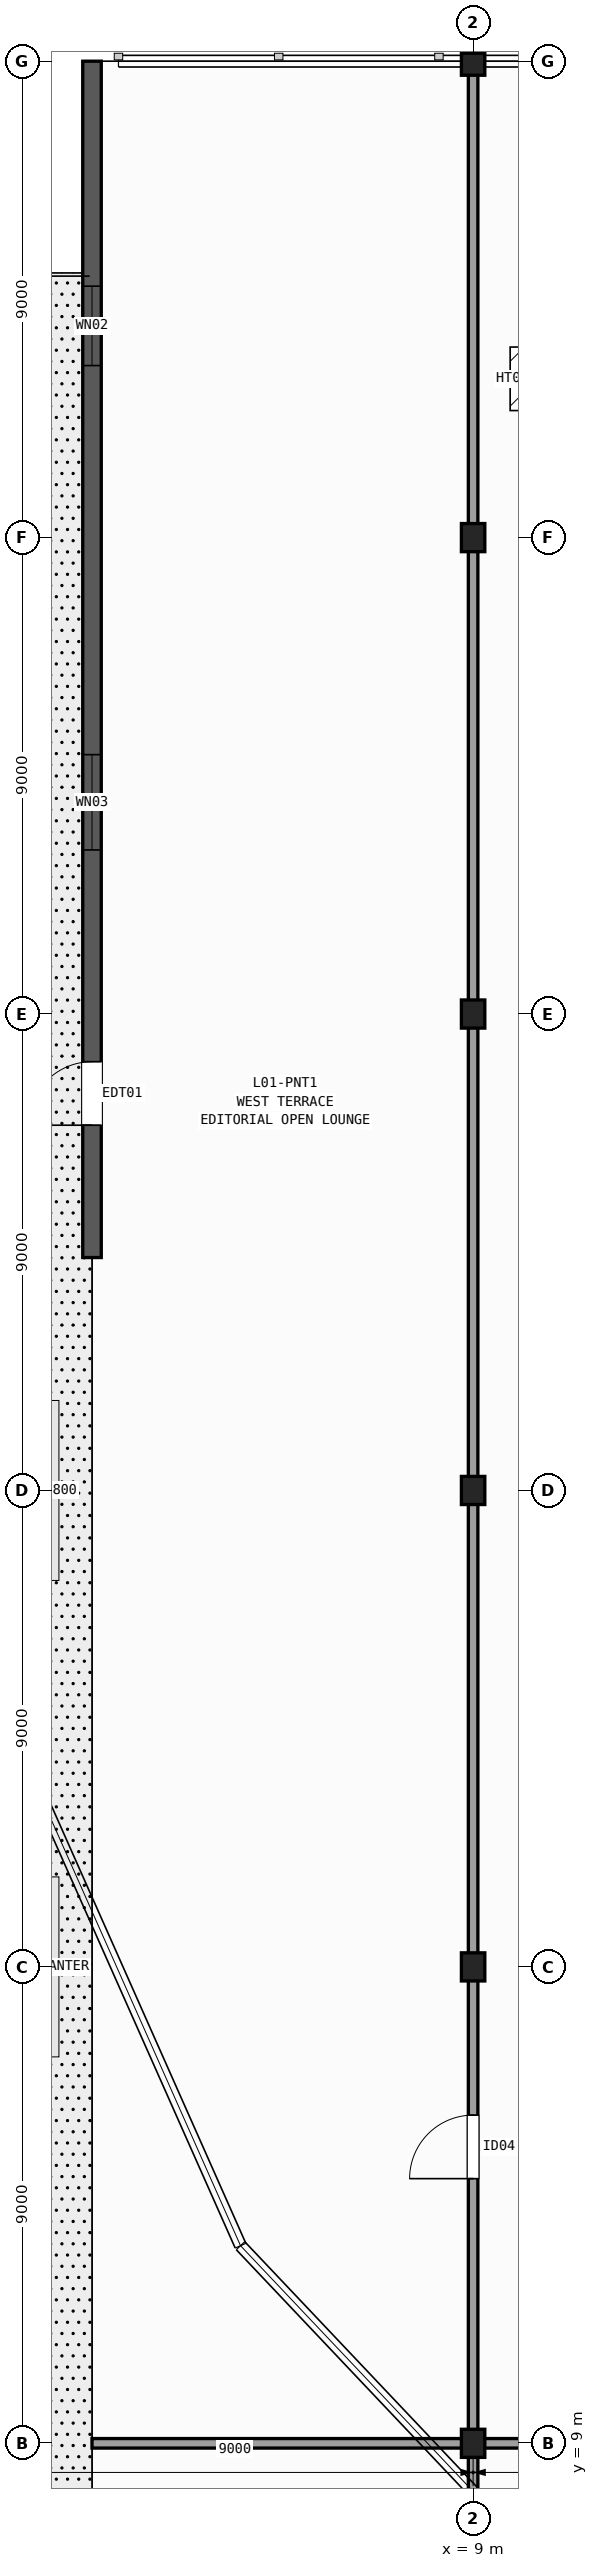
"""IFC4 building model, lengths in metres.
Left out: names, types, materials, properties, quantities, classifications, styles, units other than length and angle.
Written with IfcOpenShell. Run it as: python <this file> out.ifc"""

import sys

from ifc_helpers import new_model, si_unit, direction, frame, frame_2d, origin, origin_2d, place, context, subcontext, project, spatial, rectangle, i_section, extrude, element, fill, save


model = new_model("IFC4")
c1 = context("Model", 3, precision=1e-05, world=origin(), true_north=direction((0.0, 1.0)))
c2 = subcontext(c1, "Body", "Model", "MODEL_VIEW")
j1 = project(units=[si_unit("LENGTHUNIT", "METRE"), si_unit("PLANEANGLEUNIT", "RADIAN")], contexts=[c1])
p1 = place(None, origin())
s1 = spatial("IfcSite", under=j1, at=p1, CompositionType="ELEMENT")
p2 = place(p1, origin())
s2 = spatial("IfcBuilding", under=s1, at=p2, CompositionType="ELEMENT")
p3 = place(p2, frame((0.0, 0.0, 5.8)))
s3 = spatial("IfcBuildingStorey", under=s2, at=p3, CompositionType="ELEMENT", Elevation=5.8)
for number, where, z_axis, x_axis in (
    (1, (9.0, 9.0, 0.0), (0.0, 0.0, 1.0), (1.0, 0.0, 0.0)),
    (2, (9.0, 18.0, 0.0), (0.0, 0.0, 1.0), (1.0, 0.0, 0.0)),
    (3, (9.0, 27.0, 0.0), (0.0, 0.0, 1.0), (1.0, 0.0, 0.0)),
    (4, (9.0, 36.0, 0.0), (0.0, 0.0, 1.0), (1.0, 0.0, 0.0)),
    (5, (9.0, 45.0, 0.0), (0.0, 0.0, 1.0), (1.0, 0.0, 0.0)),
    (6, (9.0, 54.0, 0.0), (0.0, 0.0, 1.0), (1.0, 0.0, 0.0)),
):
    element("IfcColumn", number, at=place(p3, frame(where, z_axis=z_axis, x_axis=x_axis)), inside=s3, PredefinedType="COLUMN", context=c2, shape_type="SweptSolid", body=[
        extrude(i_section(OverallWidth=0.442, OverallDepth=0.531, WebThickness=0.066, FlangeThickness=0.106, FilletRadius=0.015, at=origin_2d()), origin(), (0.0, 0.0, 1.0), 5.2),
    ])
p4 = place(p3, frame((1.8, 31.4, 0.0), z_axis=(0.0, 0.0, 1.0), x_axis=(0.0, 1.0, 0.0)))
e7 = element("IfcWall", 7, at=p4, inside=s3, PredefinedType="SOLIDWALL", context=c2, shape_type="SweptSolid", body=[
    extrude(rectangle(XDim=22.6, YDim=0.35, at=frame_2d((11.3, 0.0))), origin(), (0.0, 0.0, 1.0), 4.88),
])
p5 = place(p4, frame((2.5, 0.0, 0.0)))
e8 = element("IfcOpeningElement", 8, at=p5, cuts=e7, PredefinedType="OPENING", context=c2, shape_type="SweptSolid", body=[
    extrude(rectangle(XDim=1.2, YDim=2.2, at=frame_2d((0.6, 1.1))), frame((0.0, 0.185, 0.0), z_axis=(0.0, -1.0, 0.0), x_axis=(1.0, 0.0, 0.0)), (0.0, 0.0, 1.0), 0.37),
])
p6 = place(p4, frame((7.7, 0.0, 1.0)))
e9 = element("IfcOpeningElement", 9, at=p6, cuts=e7, PredefinedType="OPENING", context=c2, shape_type="SweptSolid", body=[
    extrude(rectangle(XDim=1.8, YDim=1.8, at=frame_2d((0.9, 0.9))), frame((0.0, 0.185, 0.0), z_axis=(0.0, -1.0, 0.0), x_axis=(1.0, 0.0, 0.0)), (0.0, 0.0, 1.0), 0.37),
])
p7 = place(p4, frame((16.85, 0.0, 1.0)))
e10 = element("IfcOpeningElement", 10, at=p7, cuts=e7, PredefinedType="OPENING", context=c2, shape_type="SweptSolid", body=[
    extrude(rectangle(XDim=1.5, YDim=1.65, at=frame_2d((0.75, 0.825))), frame((0.0, 0.185, 0.0), z_axis=(0.0, -1.0, 0.0), x_axis=(1.0, 0.0, 0.0)), (0.0, 0.0, 1.0), 0.37),
])
p8 = place(p3, frame((9.0, 1.8, 0.0), z_axis=(0.0, 0.0, 1.0), x_axis=(0.0, 1.0, 0.0)))
e11 = element("IfcWall", 11, at=p8, inside=s3, PredefinedType="PARTITIONING", context=c2, shape_type="SweptSolid", body=[
    extrude(rectangle(XDim=52.2, YDim=0.18, at=frame_2d((26.1, 0.0))), origin(), (0.0, 0.0, 1.0), 3.912),
])
p9 = place(p8, frame((12.2, 0.0, 0.0)))
e12 = element("IfcOpeningElement", 12, at=p9, cuts=e11, PredefinedType="OPENING", context=c2, shape_type="SweptSolid", body=[
    extrude(rectangle(XDim=1.2, YDim=2.15, at=frame_2d((0.6, 1.075))), frame((0.0, 0.1, 0.0), z_axis=(0.0, -1.0, 0.0), x_axis=(1.0, 0.0, 0.0)), (0.0, 0.0, 1.0), 0.2),
])
p10 = place(p3, frame((1.8, 9.0, 0.0), z_axis=(0.0, 0.0, 1.0), x_axis=(1.0, 0.0, 0.0)))
e13 = element("IfcWall", 13, at=p10, inside=s3, PredefinedType="PARTITIONING", context=c2, shape_type="SweptSolid", body=[
    extrude(rectangle(XDim=22.85, YDim=0.18, at=frame_2d((11.425, 0.0))), origin(), (0.0, 0.0, 1.0), 3.933),
])
p11 = place(p10, frame((11.7, 0.0, 0.0)))
e14 = element("IfcOpeningElement", 14, at=p11, cuts=e13, PredefinedType="OPENING", context=c2, shape_type="SweptSolid", body=[
    extrude(rectangle(XDim=1.0, YDim=2.1, at=frame_2d((0.5, 1.05))), frame((0.0, 0.1, 0.0), z_axis=(0.0, -1.0, 0.0), x_axis=(1.0, 0.0, 0.0)), (0.0, 0.0, 1.0), 0.2),
])
p12 = place(p5, origin())
e15 = element("IfcDoor", 15, at=p12, inside=s3, OperationType="SINGLE_SWING_LEFT", PredefinedType="DOOR", context=c2, shape_type="SweptSolid", body=[
    extrude(rectangle(XDim=1.2, YDim=2.2, at=frame_2d((0.6, 1.1))), frame((0.0, 0.025, 0.0), z_axis=(0.0, -1.0, 0.0), x_axis=(1.0, 0.0, 0.0)), (0.0, 0.0, 1.0), 0.05),
])
fill(e8, e15)
p13 = place(p6, origin())
e16 = element("IfcWindow", 16, at=p13, inside=s3, PartitioningType="SINGLE_PANEL", PredefinedType="WINDOW", context=c2, shape_type="SweptSolid", body=[
    extrude(rectangle(XDim=1.8, YDim=1.8, at=frame_2d((0.9, 0.9))), frame((0.0, 0.03, 0.0), z_axis=(0.0, -1.0, 0.0), x_axis=(1.0, 0.0, 0.0)), (0.0, 0.0, 1.0), 0.06),
])
fill(e9, e16)
p14 = place(p7, origin())
e17 = element("IfcWindow", 17, at=p14, inside=s3, PartitioningType="SINGLE_PANEL", PredefinedType="WINDOW", context=c2, shape_type="SweptSolid", body=[
    extrude(rectangle(XDim=1.5, YDim=1.65, at=frame_2d((0.75, 0.825))), frame((0.0, 0.03, 0.0), z_axis=(0.0, -1.0, 0.0), x_axis=(1.0, 0.0, 0.0)), (0.0, 0.0, 1.0), 0.06),
])
fill(e10, e17)
p15 = place(p3, frame((0.0, 0.0, -0.32)))
p16 = place(p15, frame((10.2, 48.0, 0.0)))
p17 = place(p16, frame((0.0, 0.0, 0.27)))
e18 = element("IfcDoor", 18, at=p17, inside=s3, OperationType="SINGLE_SWING_LEFT", PredefinedType="TRAPDOOR", context=c2, shape_type="SweptSolid", body=[
    extrude(rectangle(XDim=1.0, YDim=1.2, at=origin_2d()), origin(), (0.0, 0.0, 1.0), 0.05),
])
p18 = place(p9, origin())
e19 = element("IfcDoor", 19, at=p18, inside=s3, OperationType="SINGLE_SWING_LEFT", PredefinedType="DOOR", context=c2, shape_type="SweptSolid", body=[
    extrude(rectangle(XDim=1.2, YDim=2.15, at=frame_2d((0.6, 1.075))), frame((0.0, 0.025, 0.0), z_axis=(0.0, -1.0, 0.0), x_axis=(1.0, 0.0, 0.0)), (0.0, 0.0, 1.0), 0.05),
])
fill(e12, e19)
save(model, sys.argv[1])
